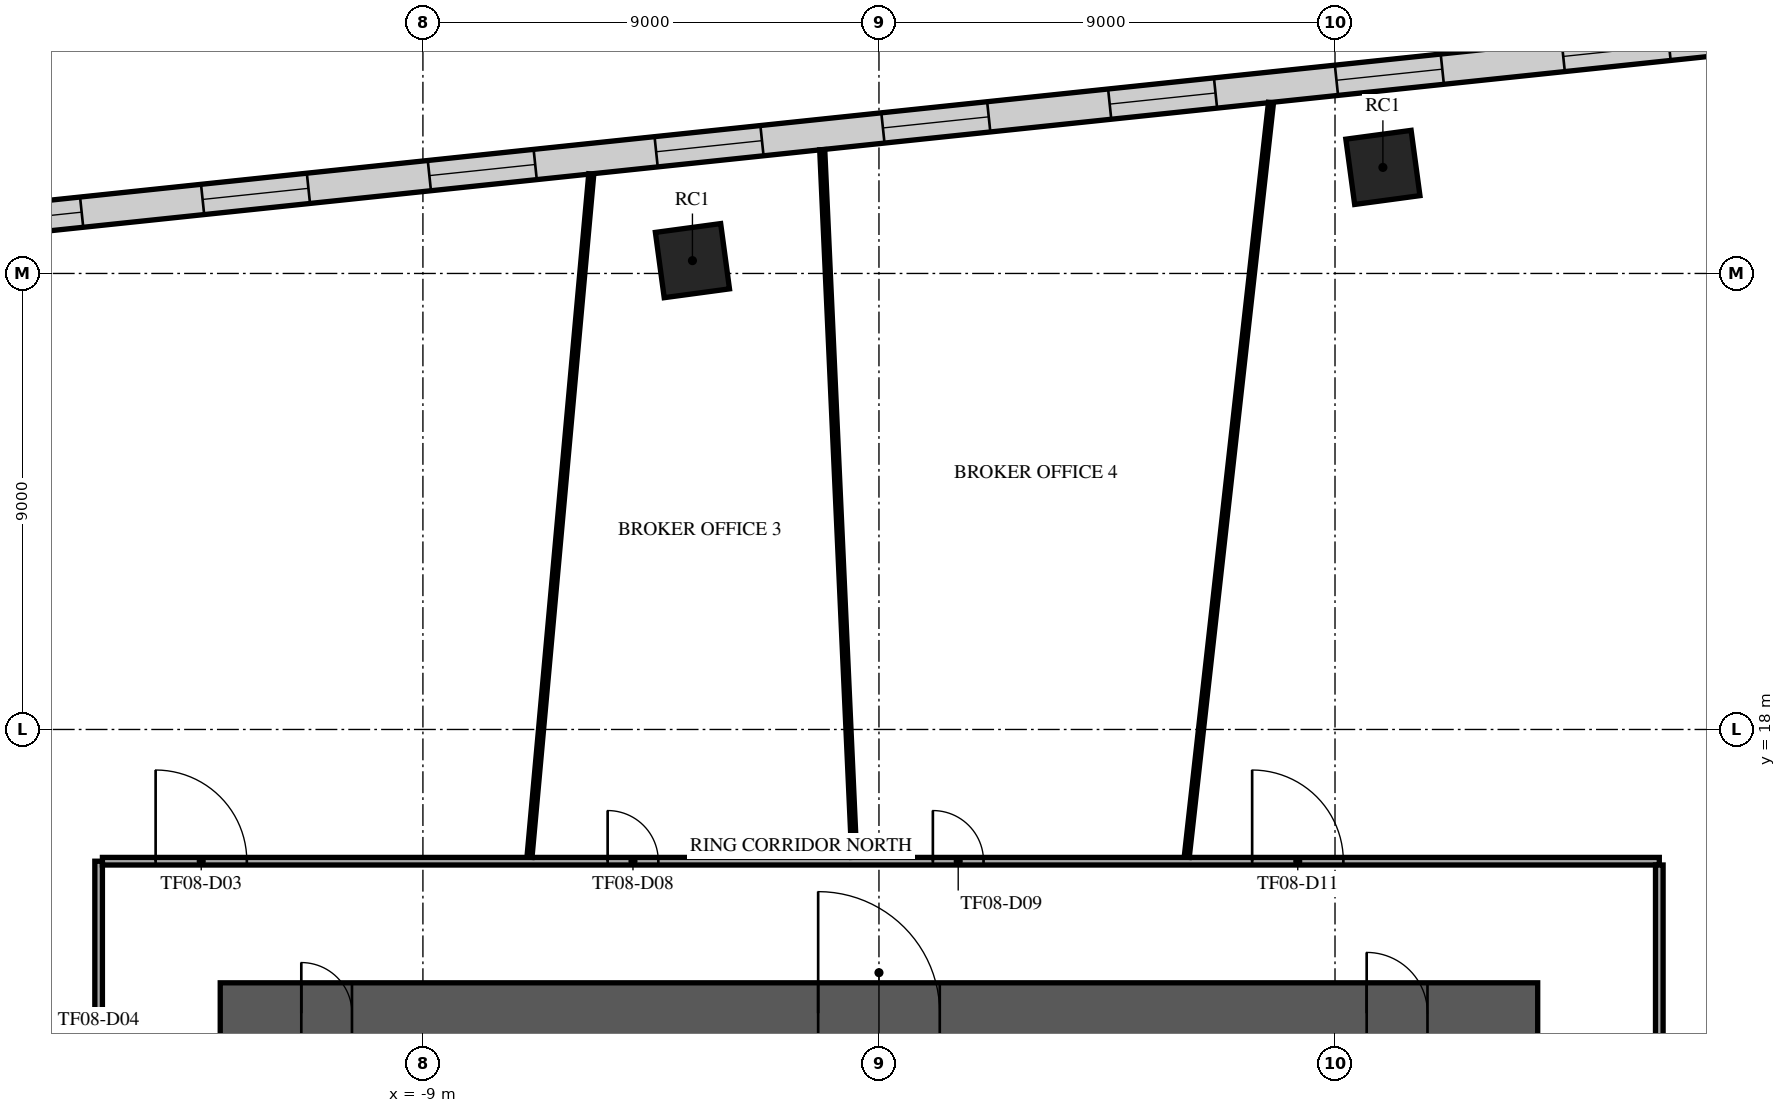
"""IFC4 building model, lengths in metres.
Left out: names, types, materials, properties, quantities, classifications, styles, units other than length and angle.
Written with IfcOpenShell. Run it as: python <this file> out.ifc"""

import sys

from ifc_helpers import new_model, si_unit, direction, frame, frame_2d, origin, origin_2d, place, context, subcontext, project, spatial, rectangle, extrude, element, fill, save


model = new_model("IFC4")
c1 = context("Model", 3, precision=1e-05, world=origin(), true_north=direction((0.0, 1.0)))
c2 = subcontext(c1, "Body", "Model", "MODEL_VIEW")
j1 = project(units=[si_unit("LENGTHUNIT", "METRE"), si_unit("PLANEANGLEUNIT", "RADIAN")], contexts=[c1])
p1 = place(None, origin())
s1 = spatial("IfcSite", under=j1, at=p1, CompositionType="ELEMENT")
p2 = place(p1, origin())
s2 = spatial("IfcBuilding", under=s1, at=p2, CompositionType="ELEMENT")
p3 = place(p2, frame((0.0, 0.0, 36.9)))
s3 = spatial("IfcBuildingStorey", under=s2, at=p3, CompositionType="ELEMENT", Elevation=36.9)
for number, where, z_axis, x_axis in (
    (1, (9.945, 29.093, 0.0), (0.0, 0.0, 1.0), (0.991, 0.134, 0.0)),
    (2, (-3.681, 27.253, 0.0), (0.0, 0.0, 1.0), (0.991, 0.134, 0.0)),
):
    element("IfcColumn", number, at=place(p3, frame(where, z_axis=z_axis, x_axis=x_axis)), inside=s3, PredefinedType="COLUMN", context=c2, shape_type="SweptSolid", body=[
        extrude(rectangle(XDim=1.3, YDim=1.3, at=origin_2d()), origin(), (0.0, 0.0, 1.0), 4.8),
    ])
p4 = place(p3, frame((-13.0, 12.4, 0.0), z_axis=(0.0, 0.0, 1.0), x_axis=(1.0, 0.0, 0.0)))
e3 = element("IfcWall", 3, at=p4, inside=s3, PredefinedType="SHEAR", context=c2, shape_type="SweptSolid", body=[
    extrude(rectangle(XDim=26.0, YDim=1.2, at=frame_2d((13.0, 0.0))), origin(), (0.0, 0.0, 1.0), 4.35),
])
p5 = place(p4, frame((11.8, 0.0, 0.0)))
e4 = element("IfcOpeningElement", 4, at=p5, cuts=e3, PredefinedType="OPENING", context=c2, shape_type="SweptSolid", body=[
    extrude(rectangle(XDim=2.4, YDim=2.4, at=frame_2d((1.2, 1.2))), frame((0.0, 0.61, 0.0), z_axis=(0.0, -1.0, 0.0), x_axis=(1.0, 0.0, 0.0)), (0.0, 0.0, 1.0), 1.22),
])
p6 = place(p4, frame((22.625, 0.0, 0.0)))
e5 = element("IfcOpeningElement", 5, at=p6, cuts=e3, PredefinedType="OPENING", context=c2, shape_type="SweptSolid", body=[
    extrude(rectangle(XDim=1.2, YDim=2.1, at=frame_2d((0.6, 1.05))), frame((0.0, 0.61, 0.0), z_axis=(0.0, -1.0, 0.0), x_axis=(1.0, 0.0, 0.0)), (0.0, 0.0, 1.0), 1.22),
])
p7 = place(p4, frame((1.6, 0.0, 0.0)))
e6 = element("IfcOpeningElement", 6, at=p7, cuts=e3, PredefinedType="OPENING", context=c2, shape_type="SweptSolid", body=[
    extrude(rectangle(XDim=1.0, YDim=2.1, at=frame_2d((0.5, 1.05))), frame((0.0, 0.61, 0.0), z_axis=(0.0, -1.0, 0.0), x_axis=(1.0, 0.0, 0.0)), (0.0, 0.0, 1.0), 1.22),
])
p8 = place(p3, frame((21.261, 32.098, 0.0), z_axis=(0.0, 0.0, 1.0), x_axis=(-0.994521967515, -0.104527776833, 0.0)))
e7 = element("IfcWall", 7, at=p8, inside=s3, PredefinedType="STANDARD", context=c2, shape_type="SweptSolid", body=[
    extrude(rectangle(XDim=49.376, YDim=0.6, at=frame_2d((24.688, 0.0))), origin(), (0.0, 0.0, 1.0), 4.35),
])
p9 = place(p8, frame((1.2, 0.0, 0.9)))
e8 = element("IfcOpeningElement", 8, at=p9, cuts=e7, PredefinedType="OPENING", context=c2, shape_type="SweptSolid", body=[
    extrude(rectangle(XDim=2.1, YDim=2.7, at=frame_2d((1.05, 1.35))), frame((0.0, 0.31, 0.0), z_axis=(0.0, -1.0, 0.0), x_axis=(1.0, 0.0, 0.0)), (0.0, 0.0, 1.0), 0.62),
])
p10 = place(p8, frame((5.7, 0.0, 0.9)))
e9 = element("IfcOpeningElement", 9, at=p10, cuts=e7, PredefinedType="OPENING", context=c2, shape_type="SweptSolid", body=[
    extrude(rectangle(XDim=2.1, YDim=2.7, at=frame_2d((1.05, 1.35))), frame((0.0, 0.31, 0.0), z_axis=(0.0, -1.0, 0.0), x_axis=(1.0, 0.0, 0.0)), (0.0, 0.0, 1.0), 0.62),
])
p11 = place(p8, frame((10.2, 0.0, 0.9)))
e10 = element("IfcOpeningElement", 10, at=p11, cuts=e7, PredefinedType="OPENING", context=c2, shape_type="SweptSolid", body=[
    extrude(rectangle(XDim=2.1, YDim=2.7, at=frame_2d((1.05, 1.35))), frame((0.0, 0.31, 0.0), z_axis=(0.0, -1.0, 0.0), x_axis=(1.0, 0.0, 0.0)), (0.0, 0.0, 1.0), 0.62),
])
p12 = place(p8, frame((14.7, 0.0, 0.9)))
e11 = element("IfcOpeningElement", 11, at=p12, cuts=e7, PredefinedType="OPENING", context=c2, shape_type="SweptSolid", body=[
    extrude(rectangle(XDim=2.1, YDim=2.7, at=frame_2d((1.05, 1.35))), frame((0.0, 0.31, 0.0), z_axis=(0.0, -1.0, 0.0), x_axis=(1.0, 0.0, 0.0)), (0.0, 0.0, 1.0), 0.62),
])
p13 = place(p8, frame((19.2, 0.0, 0.9)))
e12 = element("IfcOpeningElement", 12, at=p13, cuts=e7, PredefinedType="OPENING", context=c2, shape_type="SweptSolid", body=[
    extrude(rectangle(XDim=2.1, YDim=2.7, at=frame_2d((1.05, 1.35))), frame((0.0, 0.31, 0.0), z_axis=(0.0, -1.0, 0.0), x_axis=(1.0, 0.0, 0.0)), (0.0, 0.0, 1.0), 0.62),
])
p14 = place(p8, frame((23.7, 0.0, 0.9)))
e13 = element("IfcOpeningElement", 13, at=p14, cuts=e7, PredefinedType="OPENING", context=c2, shape_type="SweptSolid", body=[
    extrude(rectangle(XDim=2.1, YDim=2.7, at=frame_2d((1.05, 1.35))), frame((0.0, 0.31, 0.0), z_axis=(0.0, -1.0, 0.0), x_axis=(1.0, 0.0, 0.0)), (0.0, 0.0, 1.0), 0.62),
])
p15 = place(p8, frame((28.2, 0.0, 0.9)))
e14 = element("IfcOpeningElement", 14, at=p15, cuts=e7, PredefinedType="OPENING", context=c2, shape_type="SweptSolid", body=[
    extrude(rectangle(XDim=2.1, YDim=2.7, at=frame_2d((1.05, 1.35))), frame((0.0, 0.31, 0.0), z_axis=(0.0, -1.0, 0.0), x_axis=(1.0, 0.0, 0.0)), (0.0, 0.0, 1.0), 0.62),
])
p16 = place(p8, frame((32.7, 0.0, 0.9)))
e15 = element("IfcOpeningElement", 15, at=p16, cuts=e7, PredefinedType="OPENING", context=c2, shape_type="SweptSolid", body=[
    extrude(rectangle(XDim=2.1, YDim=2.7, at=frame_2d((1.05, 1.35))), frame((0.0, 0.31, 0.0), z_axis=(0.0, -1.0, 0.0), x_axis=(1.0, 0.0, 0.0)), (0.0, 0.0, 1.0), 0.62),
])
p17 = place(p8, frame((37.2, 0.0, 0.9)))
e16 = element("IfcOpeningElement", 16, at=p17, cuts=e7, PredefinedType="OPENING", context=c2, shape_type="SweptSolid", body=[
    extrude(rectangle(XDim=2.1, YDim=2.7, at=frame_2d((1.05, 1.35))), frame((0.0, 0.31, 0.0), z_axis=(0.0, -1.0, 0.0), x_axis=(1.0, 0.0, 0.0)), (0.0, 0.0, 1.0), 0.62),
])
p18 = place(p8, frame((41.7, 0.0, 0.9)))
e17 = element("IfcOpeningElement", 17, at=p18, cuts=e7, PredefinedType="OPENING", context=c2, shape_type="SweptSolid", body=[
    extrude(rectangle(XDim=2.1, YDim=2.7, at=frame_2d((1.05, 1.35))), frame((0.0, 0.31, 0.0), z_axis=(0.0, -1.0, 0.0), x_axis=(1.0, 0.0, 0.0)), (0.0, 0.0, 1.0), 0.62),
])
p19 = place(p8, frame((46.138, 0.0, 0.9)))
e18 = element("IfcOpeningElement", 18, at=p19, cuts=e7, PredefinedType="OPENING", context=c2, shape_type="SweptSolid", body=[
    extrude(rectangle(XDim=2.1, YDim=2.7, at=frame_2d((1.05, 1.35))), frame((0.0, 0.31, 0.0), z_axis=(0.0, -1.0, 0.0), x_axis=(1.0, 0.0, 0.0)), (0.0, 0.0, 1.0), 0.62),
])
p20 = place(p3, frame((-15.4, -15.4, 0.0), z_axis=(0.0, 0.0, 1.0), x_axis=(0.0, 1.0, 0.0)))
e19 = element("IfcWall", 19, at=p20, inside=s3, PredefinedType="PARTITIONING", context=c2, shape_type="SweptSolid", body=[
    extrude(rectangle(XDim=30.8, YDim=0.15, at=frame_2d((15.4, 0.0))), origin(), (0.0, 0.0, 1.0), 3.85),
])
p21 = place(p20, frame((17.735, 0.0, 0.0)))
e20 = element("IfcOpeningElement", 20, at=p21, cuts=e19, PredefinedType="OPENING", context=c2, shape_type="SweptSolid", body=[
    extrude(rectangle(XDim=1.0, YDim=2.1, at=frame_2d((0.5, 1.05))), frame((0.0, 0.085, 0.0), z_axis=(0.0, -1.0, 0.0), x_axis=(1.0, 0.0, 0.0)), (0.0, 0.0, 1.0), 0.17),
])
p22 = place(p20, frame((9.836, 0.0, 0.0)))
e21 = element("IfcOpeningElement", 21, at=p22, cuts=e19, PredefinedType="OPENING", context=c2, shape_type="SweptSolid", body=[
    extrude(rectangle(XDim=1.0, YDim=2.1, at=frame_2d((0.5, 1.05))), frame((0.0, 0.085, 0.0), z_axis=(0.0, -1.0, 0.0), x_axis=(1.0, 0.0, 0.0)), (0.0, 0.0, 1.0), 0.17),
])
p23 = place(p20, frame((25.96, 0.0, 0.0)))
e22 = element("IfcOpeningElement", 22, at=p23, cuts=e19, PredefinedType="OPENING", context=c2, shape_type="SweptSolid", body=[
    extrude(rectangle(XDim=1.0, YDim=2.1, at=frame_2d((0.5, 1.05))), frame((0.0, 0.085, 0.0), z_axis=(0.0, -1.0, 0.0), x_axis=(1.0, 0.0, 0.0)), (0.0, 0.0, 1.0), 0.17),
])
p24 = place(p20, frame((3.05, 0.0, 0.0)))
e23 = element("IfcOpeningElement", 23, at=p24, cuts=e19, PredefinedType="OPENING", context=c2, shape_type="SweptSolid", body=[
    extrude(rectangle(XDim=1.0, YDim=2.1, at=frame_2d((0.5, 1.05))), frame((0.0, 0.085, 0.0), z_axis=(0.0, -1.0, 0.0), x_axis=(1.0, 0.0, 0.0)), (0.0, 0.0, 1.0), 0.17),
])
p25 = place(p3, frame((-15.325, 15.4, 0.0), z_axis=(0.0, 0.0, 1.0), x_axis=(1.0, 0.0, 0.0)))
e24 = element("IfcWall", 24, at=p25, inside=s3, PredefinedType="PARTITIONING", context=c2, shape_type="SweptSolid", body=[
    extrude(rectangle(XDim=30.725, YDim=0.15, at=frame_2d((15.362, 0.0))), origin(), (0.0, 0.0, 1.0), 3.85),
])
p26 = place(p25, frame((1.05, 0.0, 0.0)))
e25 = element("IfcOpeningElement", 25, at=p26, cuts=e24, PredefinedType="OPENING", context=c2, shape_type="SweptSolid", body=[
    extrude(rectangle(XDim=1.8, YDim=2.1, at=frame_2d((0.9, 1.05))), frame((0.0, 0.085, 0.0), z_axis=(0.0, -1.0, 0.0), x_axis=(1.0, 0.0, 0.0)), (0.0, 0.0, 1.0), 0.17),
])
p27 = place(p25, frame((9.97, 0.0, 0.0)))
e26 = element("IfcOpeningElement", 26, at=p27, cuts=e24, PredefinedType="OPENING", context=c2, shape_type="SweptSolid", body=[
    extrude(rectangle(XDim=1.0, YDim=2.1, at=frame_2d((0.5, 1.05))), frame((0.0, 0.085, 0.0), z_axis=(0.0, -1.0, 0.0), x_axis=(1.0, 0.0, 0.0)), (0.0, 0.0, 1.0), 0.17),
])
p28 = place(p25, frame((16.389, 0.0, 0.0)))
e27 = element("IfcOpeningElement", 27, at=p28, cuts=e24, PredefinedType="OPENING", context=c2, shape_type="SweptSolid", body=[
    extrude(rectangle(XDim=1.0, YDim=2.1, at=frame_2d((0.5, 1.05))), frame((0.0, 0.085, 0.0), z_axis=(0.0, -1.0, 0.0), x_axis=(1.0, 0.0, 0.0)), (0.0, 0.0, 1.0), 0.17),
])
p29 = place(p25, frame((22.69, 0.0, 0.0)))
e28 = element("IfcOpeningElement", 28, at=p29, cuts=e24, PredefinedType="OPENING", context=c2, shape_type="SweptSolid", body=[
    extrude(rectangle(XDim=1.8, YDim=2.1, at=frame_2d((0.9, 1.05))), frame((0.0, 0.085, 0.0), z_axis=(0.0, -1.0, 0.0), x_axis=(1.0, 0.0, 0.0)), (0.0, 0.0, 1.0), 0.17),
])
p30 = place(p3, frame((15.4, -15.325, 0.0), z_axis=(0.0, 0.0, 1.0), x_axis=(0.0, 1.0, 0.0)))
e29 = element("IfcWall", 29, at=p30, inside=s3, PredefinedType="PARTITIONING", context=c2, shape_type="SweptSolid", body=[
    extrude(rectangle(XDim=30.65, YDim=0.15, at=frame_2d((15.325, 0.0))), origin(), (0.0, 0.0, 1.0), 3.85),
])
p31 = place(p30, frame((19.986, 0.0, 0.0)))
e30 = element("IfcOpeningElement", 30, at=p31, cuts=e29, PredefinedType="OPENING", context=c2, shape_type="SweptSolid", body=[
    extrude(rectangle(XDim=1.0, YDim=2.1, at=frame_2d((0.5, 1.05))), frame((0.0, 0.085, 0.0), z_axis=(0.0, -1.0, 0.0), x_axis=(1.0, 0.0, 0.0)), (0.0, 0.0, 1.0), 0.17),
])
p32 = place(p30, frame((8.197, 0.0, 0.0)))
e31 = element("IfcOpeningElement", 31, at=p32, cuts=e29, PredefinedType="OPENING", context=c2, shape_type="SweptSolid", body=[
    extrude(rectangle(XDim=1.0, YDim=2.1, at=frame_2d((0.5, 1.05))), frame((0.0, 0.085, 0.0), z_axis=(0.0, -1.0, 0.0), x_axis=(1.0, 0.0, 0.0)), (0.0, 0.0, 1.0), 0.17),
])
p33 = place(p3, frame((-6.897, 15.479, 0.0), z_axis=(0.0, 0.0, 1.0), x_axis=(0.090073977657, 0.995935077477, 0.0)))
e32 = element("IfcWall", 32, at=p33, inside=s3, PredefinedType="PARTITIONING", context=c2, shape_type="SweptSolid", body=[
    extrude(rectangle(XDim=13.539, YDim=0.1, at=frame_2d((6.769, 0.0))), origin(), (0.0, 0.0, 1.0), 3.55),
])
p34 = place(p3, frame((-1.12, 29.442, 0.0), z_axis=(0.0, 0.0, 1.0), x_axis=(0.045215945181, -0.998977236128, 0.0)))
e33 = element("IfcWall", 33, at=p34, inside=s3, PredefinedType="PARTITIONING", context=c2, shape_type="SweptSolid", body=[
    extrude(rectangle(XDim=13.979, YDim=0.1, at=frame_2d((6.99, 0.0))), origin(), (0.0, 0.0, 1.0), 3.55),
])
p35 = place(p3, frame((6.074, 15.48, 0.0), z_axis=(0.0, 0.0, 1.0), x_axis=(0.110950080777, 0.99382598053, 0.0)))
e34 = element("IfcWall", 34, at=p35, inside=s3, PredefinedType="PARTITIONING", context=c2, shape_type="SweptSolid", body=[
    extrude(rectangle(XDim=14.985, YDim=0.1, at=frame_2d((7.493, 0.0))), origin(), (0.0, 0.0, 1.0), 3.55),
])
p36 = place(p5, origin())
e35 = element("IfcDoor", 35, at=p36, inside=s3, OperationType="SINGLE_SWING_LEFT", PredefinedType="DOOR", context=c2, shape_type="SweptSolid", body=[
    extrude(rectangle(XDim=2.4, YDim=2.4, at=frame_2d((1.2, 1.2))), frame((0.0, 0.025, 0.0), z_axis=(0.0, -1.0, 0.0), x_axis=(1.0, 0.0, 0.0)), (0.0, 0.0, 1.0), 0.05),
])
fill(e4, e35)
p37 = place(p6, origin())
e36 = element("IfcDoor", 36, at=p37, inside=s3, OperationType="SINGLE_SWING_LEFT", PredefinedType="DOOR", context=c2, shape_type="SweptSolid", body=[
    extrude(rectangle(XDim=1.2, YDim=2.1, at=frame_2d((0.6, 1.05))), frame((0.0, 0.025, 0.0), z_axis=(0.0, -1.0, 0.0), x_axis=(1.0, 0.0, 0.0)), (0.0, 0.0, 1.0), 0.05),
])
fill(e5, e36)
p38 = place(p7, origin())
e37 = element("IfcDoor", 37, at=p38, inside=s3, OperationType="SINGLE_SWING_LEFT", PredefinedType="DOOR", context=c2, shape_type="SweptSolid", body=[
    extrude(rectangle(XDim=1.0, YDim=2.1, at=frame_2d((0.5, 1.05))), frame((0.0, 0.025, 0.0), z_axis=(0.0, -1.0, 0.0), x_axis=(1.0, 0.0, 0.0)), (0.0, 0.0, 1.0), 0.05),
])
fill(e6, e37)
p39 = place(p10, origin())
e38 = element("IfcWindow", 38, at=p39, inside=s3, PartitioningType="SINGLE_PANEL", PredefinedType="WINDOW", context=c2, shape_type="SweptSolid", body=[
    extrude(rectangle(XDim=2.1, YDim=2.7, at=frame_2d((1.05, 1.35))), frame((0.0, 0.03, 0.0), z_axis=(0.0, -1.0, 0.0), x_axis=(1.0, 0.0, 0.0)), (0.0, 0.0, 1.0), 0.06),
])
fill(e9, e38)
p40 = place(p11, origin())
e39 = element("IfcWindow", 39, at=p40, inside=s3, PartitioningType="SINGLE_PANEL", PredefinedType="WINDOW", context=c2, shape_type="SweptSolid", body=[
    extrude(rectangle(XDim=2.1, YDim=2.7, at=frame_2d((1.05, 1.35))), frame((0.0, 0.03, 0.0), z_axis=(0.0, -1.0, 0.0), x_axis=(1.0, 0.0, 0.0)), (0.0, 0.0, 1.0), 0.06),
])
fill(e10, e39)
p41 = place(p12, origin())
e40 = element("IfcWindow", 40, at=p41, inside=s3, PartitioningType="SINGLE_PANEL", PredefinedType="WINDOW", context=c2, shape_type="SweptSolid", body=[
    extrude(rectangle(XDim=2.1, YDim=2.7, at=frame_2d((1.05, 1.35))), frame((0.0, 0.03, 0.0), z_axis=(0.0, -1.0, 0.0), x_axis=(1.0, 0.0, 0.0)), (0.0, 0.0, 1.0), 0.06),
])
fill(e11, e40)
p42 = place(p13, origin())
e41 = element("IfcWindow", 41, at=p42, inside=s3, PartitioningType="SINGLE_PANEL", PredefinedType="WINDOW", context=c2, shape_type="SweptSolid", body=[
    extrude(rectangle(XDim=2.1, YDim=2.7, at=frame_2d((1.05, 1.35))), frame((0.0, 0.03, 0.0), z_axis=(0.0, -1.0, 0.0), x_axis=(1.0, 0.0, 0.0)), (0.0, 0.0, 1.0), 0.06),
])
fill(e12, e41)
p43 = place(p14, origin())
e42 = element("IfcWindow", 42, at=p43, inside=s3, PartitioningType="SINGLE_PANEL", PredefinedType="WINDOW", context=c2, shape_type="SweptSolid", body=[
    extrude(rectangle(XDim=2.1, YDim=2.7, at=frame_2d((1.05, 1.35))), frame((0.0, 0.03, 0.0), z_axis=(0.0, -1.0, 0.0), x_axis=(1.0, 0.0, 0.0)), (0.0, 0.0, 1.0), 0.06),
])
fill(e13, e42)
p44 = place(p15, origin())
e43 = element("IfcWindow", 43, at=p44, inside=s3, PartitioningType="SINGLE_PANEL", PredefinedType="WINDOW", context=c2, shape_type="SweptSolid", body=[
    extrude(rectangle(XDim=2.1, YDim=2.7, at=frame_2d((1.05, 1.35))), frame((0.0, 0.03, 0.0), z_axis=(0.0, -1.0, 0.0), x_axis=(1.0, 0.0, 0.0)), (0.0, 0.0, 1.0), 0.06),
])
fill(e14, e43)
p45 = place(p16, origin())
e44 = element("IfcWindow", 44, at=p45, inside=s3, PartitioningType="SINGLE_PANEL", PredefinedType="WINDOW", context=c2, shape_type="SweptSolid", body=[
    extrude(rectangle(XDim=2.1, YDim=2.7, at=frame_2d((1.05, 1.35))), frame((0.0, 0.03, 0.0), z_axis=(0.0, -1.0, 0.0), x_axis=(1.0, 0.0, 0.0)), (0.0, 0.0, 1.0), 0.06),
])
fill(e15, e44)
p46 = place(p17, origin())
e45 = element("IfcWindow", 45, at=p46, inside=s3, PartitioningType="SINGLE_PANEL", PredefinedType="WINDOW", context=c2, shape_type="SweptSolid", body=[
    extrude(rectangle(XDim=2.1, YDim=2.7, at=frame_2d((1.05, 1.35))), frame((0.0, 0.03, 0.0), z_axis=(0.0, -1.0, 0.0), x_axis=(1.0, 0.0, 0.0)), (0.0, 0.0, 1.0), 0.06),
])
fill(e16, e45)
p47 = place(p26, origin())
e46 = element("IfcDoor", 46, at=p47, inside=s3, OperationType="DOUBLE_DOOR_SINGLE_SWING", PredefinedType="DOOR", context=c2, shape_type="SweptSolid", body=[
    extrude(rectangle(XDim=1.8, YDim=2.1, at=frame_2d((0.9, 1.05))), frame((0.0, 0.025, 0.0), z_axis=(0.0, -1.0, 0.0), x_axis=(1.0, 0.0, 0.0)), (0.0, 0.0, 1.0), 0.05),
])
fill(e25, e46)
p48 = place(p27, origin())
e47 = element("IfcDoor", 47, at=p48, inside=s3, OperationType="SINGLE_SWING_LEFT", PredefinedType="DOOR", context=c2, shape_type="SweptSolid", body=[
    extrude(rectangle(XDim=1.0, YDim=2.1, at=frame_2d((0.5, 1.05))), frame((0.0, 0.025, 0.0), z_axis=(0.0, -1.0, 0.0), x_axis=(1.0, 0.0, 0.0)), (0.0, 0.0, 1.0), 0.05),
])
fill(e26, e47)
p49 = place(p28, origin())
e48 = element("IfcDoor", 48, at=p49, inside=s3, OperationType="SINGLE_SWING_LEFT", PredefinedType="DOOR", context=c2, shape_type="SweptSolid", body=[
    extrude(rectangle(XDim=1.0, YDim=2.1, at=frame_2d((0.5, 1.05))), frame((0.0, 0.025, 0.0), z_axis=(0.0, -1.0, 0.0), x_axis=(1.0, 0.0, 0.0)), (0.0, 0.0, 1.0), 0.05),
])
fill(e27, e48)
p50 = place(p29, origin())
e49 = element("IfcDoor", 49, at=p50, inside=s3, OperationType="DOUBLE_DOOR_SINGLE_SWING", PredefinedType="DOOR", context=c2, shape_type="SweptSolid", body=[
    extrude(rectangle(XDim=1.8, YDim=2.1, at=frame_2d((0.9, 1.05))), frame((0.0, 0.025, 0.0), z_axis=(0.0, -1.0, 0.0), x_axis=(1.0, 0.0, 0.0)), (0.0, 0.0, 1.0), 0.05),
])
fill(e28, e49)
save(model, sys.argv[1])
